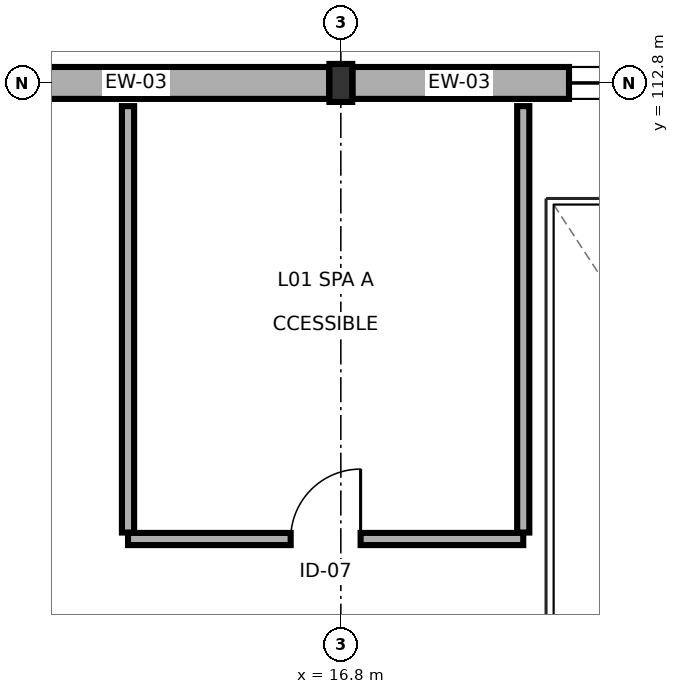
"""IFC4 building model, lengths in metres.
Left out: names, types, materials, properties, quantities, classifications, styles, units other than length and angle.
Written with IfcOpenShell. Run it as: python <this file> out.ifc"""

import sys

from ifc_helpers import new_model, si_unit, direction, frame, frame_2d, origin, origin_2d, place, context, subcontext, project, spatial, rectangle, i_section, extrude, element, fill, save


model = new_model("IFC4")
c1 = context("Model", 3, precision=1e-05, world=origin(), true_north=direction((0.0, 1.0)))
c2 = subcontext(c1, "Body", "Model", "MODEL_VIEW")
j1 = project(units=[si_unit("LENGTHUNIT", "METRE"), si_unit("PLANEANGLEUNIT", "RADIAN")], contexts=[c1])
p1 = place(None, origin())
s1 = spatial("IfcSite", under=j1, at=p1, CompositionType="ELEMENT")
p2 = place(p1, origin())
s2 = spatial("IfcBuilding", under=s1, at=p2, CompositionType="ELEMENT")
p3 = place(p2, origin())
s3 = spatial("IfcBuildingStorey", under=s2, at=p3, CompositionType="ELEMENT", Elevation=0.0)
p4 = place(p3, frame((16.8, 112.8, 0.0), z_axis=(0.0, 0.0, 1.0), x_axis=(1.0, 0.0, 0.0)))
e1 = element("IfcColumn", 1, at=p4, inside=s3, PredefinedType="COLUMN", context=c2, shape_type="SweptSolid", body=[
    extrude(i_section(OverallWidth=0.3, OverallDepth=0.5, WebThickness=0.014, FlangeThickness=0.028, FilletRadius=0.027, at=origin_2d()), origin(), (0.0, 0.0, 1.0), 5.4),
])
p5 = place(p3, frame((7.354, 112.8, 0.0), z_axis=(0.0, 0.0, 1.0), x_axis=(1.0, 0.0, 0.0)))
e2 = element("IfcWall", 2, at=p5, inside=s3, PredefinedType="SOLIDWALL", context=c2, shape_type="SweptSolid", body=[
    extrude(rectangle(XDim=9.292, YDim=0.42, at=frame_2d((4.646, 0.0))), origin(), (0.0, 0.0, 1.0), 4.625),
])
p6 = place(p5, frame((1.623, 0.0, 0.75)))
e3 = element("IfcOpeningElement", 3, at=p6, cuts=e2, PredefinedType="OPENING", context=c2, shape_type="SweptSolid", body=[
    extrude(rectangle(XDim=2.55, YDim=1.95, at=frame_2d((1.275, 0.975))), frame((0.0, 0.22, 0.0), z_axis=(0.0, -1.0, 0.0), x_axis=(1.0, 0.0, 0.0)), (0.0, 0.0, 1.0), 0.44),
])
p7 = place(p3, frame((16.954, 112.8, 0.0), z_axis=(0.0, 0.0, 1.0), x_axis=(1.0, 0.0, 0.0)))
e4 = element("IfcWall", 4, at=p7, inside=s3, PredefinedType="SOLIDWALL", context=c2, shape_type="SweptSolid", body=[
    extrude(rectangle(XDim=9.292, YDim=0.42, at=frame_2d((4.646, 0.0))), origin(), (0.0, 0.0, 1.0), 4.685),
])
p8 = place(p7, frame((2.848, 0.0, 0.75)))
e5 = element("IfcOpeningElement", 5, at=p8, cuts=e4, PredefinedType="OPENING", context=c2, shape_type="SweptSolid", body=[
    extrude(rectangle(XDim=1.2, YDim=2.1, at=frame_2d((0.6, 1.05))), frame((0.0, 0.22, 0.0), z_axis=(0.0, -1.0, 0.0), x_axis=(1.0, 0.0, 0.0)), (0.0, 0.0, 1.0), 0.44),
])
p9 = place(p7, frame((5.794, 0.0, 0.75)))
e6 = element("IfcOpeningElement", 6, at=p9, cuts=e4, PredefinedType="OPENING", context=c2, shape_type="SweptSolid", body=[
    extrude(rectangle(XDim=1.2, YDim=2.1, at=frame_2d((0.6, 1.05))), frame((0.0, 0.22, 0.0), z_axis=(0.0, -1.0, 0.0), x_axis=(1.0, 0.0, 0.0)), (0.0, 0.0, 1.0), 0.44),
])
p10 = place(p3, frame((14.0, 106.8, 0.0), z_axis=(0.0, 0.0, 1.0), x_axis=(1.0, 0.0, 0.0)))
e7 = element("IfcWall", 7, at=p10, inside=s3, PredefinedType="PARTITIONING", context=c2, shape_type="SweptSolid", body=[
    extrude(rectangle(XDim=5.2, YDim=0.16, at=frame_2d((2.6, 0.0))), origin(), (0.0, 0.0, 1.0), 5.14),
])
p11 = place(p10, frame((2.14, 0.0, 0.0)))
e8 = element("IfcOpeningElement", 8, at=p11, cuts=e7, PredefinedType="OPENING", context=c2, shape_type="SweptSolid", body=[
    extrude(rectangle(XDim=0.92, YDim=2.1, at=frame_2d((0.46, 1.05))), frame((0.0, 0.09, 0.0), z_axis=(0.0, -1.0, 0.0), x_axis=(1.0, 0.0, 0.0)), (0.0, 0.0, 1.0), 0.18),
])
for number, where, z_axis, x_axis in (
    (9, (14.0, 106.885, 0.0), (0.0, 0.0, 1.0), (0.0, 1.0, 0.0)),
    (10, (19.2, 106.885, 0.0), (0.0, 0.0, 1.0), (0.0, 1.0, 0.0)),
):
    element("IfcWall", number, at=place(p3, frame(where, z_axis=z_axis, x_axis=x_axis)), inside=s3, PredefinedType="PARTITIONING", context=c2, shape_type="SweptSolid", body=[
        extrude(rectangle(XDim=5.61, YDim=0.16, at=frame_2d((2.805, 0.0))), origin(), (0.0, 0.0, 1.0), 5.14),
    ])
p12 = place(p8, origin())
e11 = element("IfcWindow", 11, at=p12, inside=s3, PartitioningType="SINGLE_PANEL", PredefinedType="WINDOW", context=c2, shape_type="SweptSolid", body=[
    extrude(rectangle(XDim=1.2, YDim=2.1, at=frame_2d((0.6, 1.05))), frame((0.0, 0.03, 0.0), z_axis=(0.0, -1.0, 0.0), x_axis=(1.0, 0.0, 0.0)), (0.0, 0.0, 1.0), 0.06),
])
fill(e5, e11)
p13 = place(p11, origin())
e12 = element("IfcDoor", 12, at=p13, inside=s3, OperationType="SINGLE_SWING_RIGHT", PredefinedType="DOOR", context=c2, shape_type="SweptSolid", body=[
    extrude(rectangle(XDim=0.92, YDim=2.1, at=frame_2d((0.46, 1.05))), frame((0.0, 0.025, 0.0), z_axis=(0.0, -1.0, 0.0), x_axis=(1.0, 0.0, 0.0)), (0.0, 0.0, 1.0), 0.05),
])
fill(e8, e12)
save(model, sys.argv[1])
